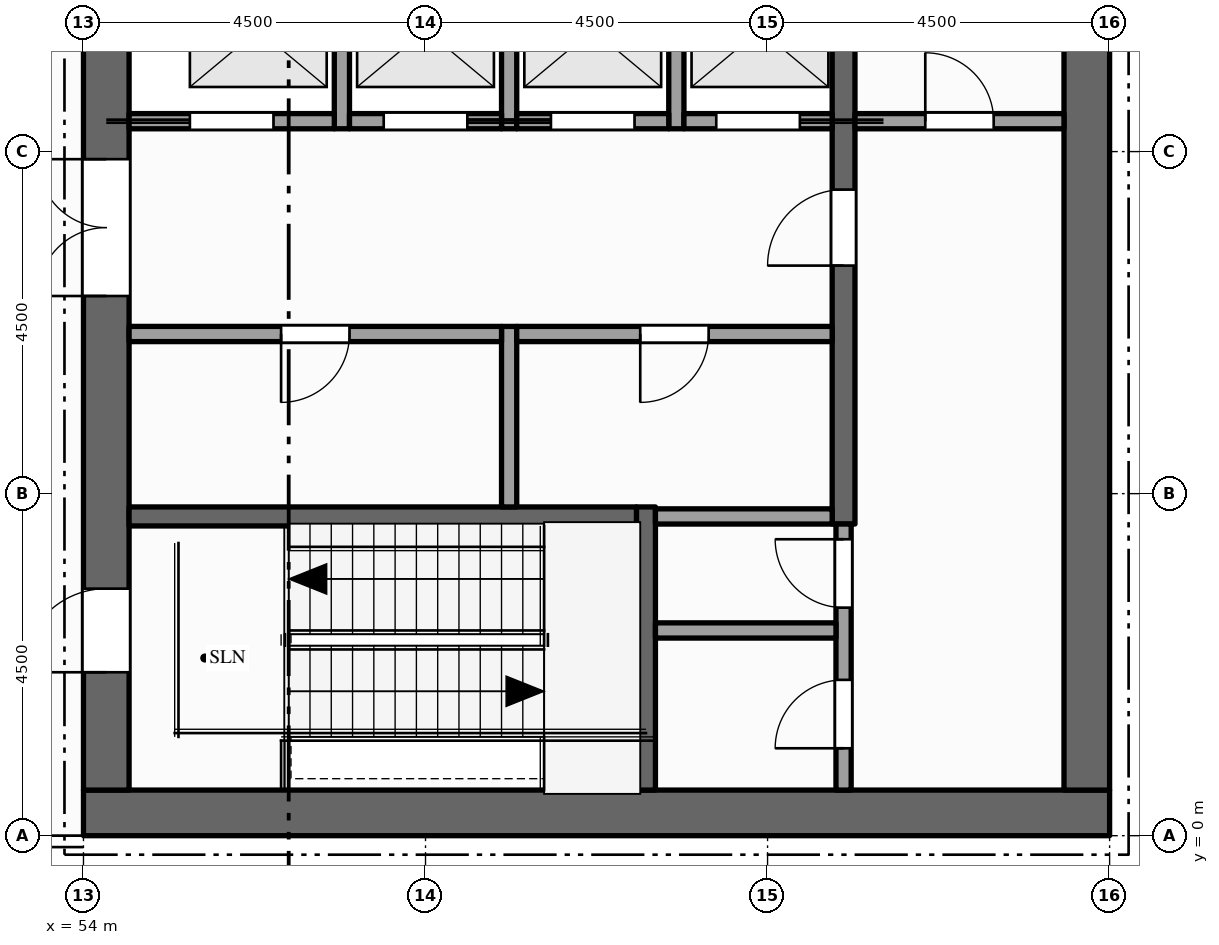
"""IFC4 building model, lengths in metres.
Left out: names, types, materials, properties, quantities, classifications, styles, units other than length and angle.
Written with IfcOpenShell. Run it as: python <this file> out.ifc"""

import sys

from ifc_helpers import new_model, si_unit, direction, frame, frame_2d, origin, place, context, subcontext, project, spatial, rectangle, extrude, element, fill, save


model = new_model("IFC4")
c1 = context("Model", 3, precision=1e-05, world=origin(), true_north=direction((0.0, 1.0)))
c2 = subcontext(c1, "Body", "Model", "MODEL_VIEW")
j1 = project(units=[si_unit("LENGTHUNIT", "METRE"), si_unit("PLANEANGLEUNIT", "RADIAN")], contexts=[c1])
p1 = place(None, origin())
s1 = spatial("IfcSite", under=j1, at=p1, CompositionType="ELEMENT")
p2 = place(p1, origin())
s2 = spatial("IfcBuilding", under=s1, at=p2, CompositionType="ELEMENT")
p3 = place(p2, frame((0.0, 0.0, 305.0)))
s3 = spatial("IfcBuildingStorey", under=s2, at=p3, CompositionType="ELEMENT", Elevation=305.0)
p4 = place(p3, frame((67.5, 0.3, -0.15), z_axis=(0.0, 0.0, 1.0), x_axis=(-1.0, 0.0, 0.0)))
e1 = element("IfcWall", 1, at=p4, inside=s3, PredefinedType="SHEAR", context=c2, shape_type="SweptSolid", body=[
    extrude(rectangle(XDim=13.5, YDim=0.6, at=frame_2d((6.75, 0.0))), origin(), (0.0, 0.0, 1.0), 4.5),
])
p5 = place(p3, frame((54.3, 0.6, -0.15), z_axis=(0.0, 0.0, 1.0), x_axis=(0.0, 1.0, 0.0)))
e2 = element("IfcWall", 2, at=p5, inside=s3, PredefinedType="SHEAR", context=c2, shape_type="SweptSolid", body=[
    extrude(rectangle(XDim=21.3, YDim=0.6, at=frame_2d((10.65, 0.0))), origin(), (0.0, 0.0, 1.0), 4.5),
])
p6 = place(p5, frame((6.5, 0.0, 0.15)))
e3 = element("IfcOpeningElement", 3, at=p6, cuts=e2, PredefinedType="OPENING", context=c2, shape_type="SweptSolid", body=[
    extrude(rectangle(XDim=1.8, YDim=2.1, at=frame_2d((0.9, 1.05))), frame((0.0, 0.31, 0.0), z_axis=(0.0, -1.0, 0.0), x_axis=(1.0, 0.0, 0.0)), (0.0, 0.0, 1.0), 0.62),
])
p7 = place(p5, frame((12.55, 0.0, 0.15)))
e4 = element("IfcOpeningElement", 4, at=p7, cuts=e2, PredefinedType="OPENING", context=c2, shape_type="SweptSolid", body=[
    extrude(rectangle(XDim=1.1, YDim=2.1, at=frame_2d((0.55, 1.05))), frame((0.0, 0.31, 0.0), z_axis=(0.0, -1.0, 0.0), x_axis=(1.0, 0.0, 0.0)), (0.0, 0.0, 1.0), 0.62),
])
p8 = place(p5, frame((1.55, 0.0, 0.15)))
e5 = element("IfcOpeningElement", 5, at=p8, cuts=e2, PredefinedType="OPENING", context=c2, shape_type="SweptSolid", body=[
    extrude(rectangle(XDim=1.1, YDim=2.1, at=frame_2d((0.55, 1.05))), frame((0.0, 0.31, 0.0), z_axis=(0.0, -1.0, 0.0), x_axis=(1.0, 0.0, 0.0)), (0.0, 0.0, 1.0), 0.62),
])
p9 = place(p5, frame((18.75, 0.0, 0.15)))
e6 = element("IfcOpeningElement", 6, at=p9, cuts=e2, PredefinedType="OPENING", context=c2, shape_type="SweptSolid", body=[
    extrude(rectangle(XDim=1.1, YDim=2.1, at=frame_2d((0.55, 1.05))), frame((0.0, 0.31, 0.0), z_axis=(0.0, -1.0, 0.0), x_axis=(1.0, 0.0, 0.0)), (0.0, 0.0, 1.0), 0.62),
])
p10 = place(p3, frame((67.2, 0.6, -0.15), z_axis=(0.0, 0.0, 1.0), x_axis=(0.0, 1.0, 0.0)))
e7 = element("IfcWall", 7, at=p10, inside=s3, PredefinedType="SHEAR", context=c2, shape_type="SweptSolid", body=[
    extrude(rectangle(XDim=21.3, YDim=0.6, at=frame_2d((10.65, 0.0))), origin(), (0.0, 0.0, 1.0), 4.5),
])
p11 = place(p3, frame((57.4, 9.3, 0.0), z_axis=(0.0, 0.0, 1.0), x_axis=(0.0, 1.0, 0.0)))
e8 = element("IfcWall", 8, at=p11, inside=s3, PredefinedType="SOLIDWALL", context=c2, shape_type="SweptSolid", body=[
    extrude(rectangle(XDim=2.6, YDim=0.2, at=frame_2d((1.3, 0.0))), origin(), (0.0, 0.0, 1.0), 4.35),
])
p12 = place(p3, frame((59.6, 4.325, 0.0), z_axis=(0.0, 0.0, 1.0), x_axis=(0.0, 1.0, 0.0)))
e9 = element("IfcWall", 9, at=p12, inside=s3, PredefinedType="PARTITIONING", context=c2, shape_type="SweptSolid", body=[
    extrude(rectangle(XDim=2.375, YDim=0.2, at=frame_2d((1.188, 0.0))), origin(), (0.0, 0.0, 1.0), 4.35),
])
p13 = place(p3, frame((59.6, 9.3, 0.0), z_axis=(0.0, 0.0, 1.0), x_axis=(0.0, 1.0, 0.0)))
e10 = element("IfcWall", 10, at=p13, inside=s3, PredefinedType="SOLIDWALL", context=c2, shape_type="SweptSolid", body=[
    extrude(rectangle(XDim=2.6, YDim=0.2, at=frame_2d((1.3, 0.0))), origin(), (0.0, 0.0, 1.0), 4.35),
])
p14 = place(p3, frame((61.4, 0.6, 0.0), z_axis=(0.0, 0.0, 1.0), x_axis=(0.0, 1.0, 0.0)))
e11 = element("IfcWall", 11, at=p14, inside=s3, PredefinedType="SHEAR", context=c2, shape_type="SweptSolid", body=[
    extrude(rectangle(XDim=3.725, YDim=0.25, at=frame_2d((1.862, 0.0))), origin(), (0.0, 0.0, 1.0), 4.35),
])
p15 = place(p3, frame((61.8, 9.3, 0.0), z_axis=(0.0, 0.0, 1.0), x_axis=(0.0, 1.0, 0.0)))
e12 = element("IfcWall", 12, at=p15, inside=s3, PredefinedType="SOLIDWALL", context=c2, shape_type="SweptSolid", body=[
    extrude(rectangle(XDim=2.6, YDim=0.2, at=frame_2d((1.3, 0.0))), origin(), (0.0, 0.0, 1.0), 4.35),
])
p16 = place(p3, frame((64.0, 0.6, 0.0), z_axis=(0.0, 0.0, 1.0), x_axis=(0.0, 1.0, 0.0)))
e13 = element("IfcWall", 13, at=p16, inside=s3, PredefinedType="PARTITIONING", context=c2, shape_type="SweptSolid", body=[
    extrude(rectangle(XDim=3.5, YDim=0.2, at=frame_2d((1.75, 0.0))), origin(), (0.0, 0.0, 1.0), 4.35),
])
p17 = place(p16, frame((0.55, 0.0, 0.0)))
e14 = element("IfcOpeningElement", 14, at=p17, cuts=e13, PredefinedType="OPENING", context=c2, shape_type="SweptSolid", body=[
    extrude(rectangle(XDim=0.9, YDim=2.1, at=frame_2d((0.45, 1.05))), frame((0.0, 0.11, 0.0), z_axis=(0.0, -1.0, 0.0), x_axis=(1.0, 0.0, 0.0)), (0.0, 0.0, 1.0), 0.22),
])
p18 = place(p16, frame((2.4, 0.0, 0.0)))
e15 = element("IfcOpeningElement", 15, at=p18, cuts=e13, PredefinedType="OPENING", context=c2, shape_type="SweptSolid", body=[
    extrude(rectangle(XDim=0.9, YDim=2.1, at=frame_2d((0.45, 1.05))), frame((0.0, 0.11, 0.0), z_axis=(0.0, -1.0, 0.0), x_axis=(1.0, 0.0, 0.0)), (0.0, 0.0, 1.0), 0.22),
])
p19 = place(p3, frame((64.0, 4.1, 0.0), z_axis=(0.0, 0.0, 1.0), x_axis=(0.0, 1.0, 0.0)))
e16 = element("IfcWall", 16, at=p19, inside=s3, PredefinedType="SHEAR", context=c2, shape_type="SweptSolid", body=[
    extrude(rectangle(XDim=14.5, YDim=0.3, at=frame_2d((7.25, 0.0))), origin(), (0.0, 0.0, 1.0), 4.35),
])
p20 = place(p19, frame((3.4, 0.0, 0.0)))
e17 = element("IfcOpeningElement", 17, at=p20, cuts=e16, PredefinedType="OPENING", context=c2, shape_type="SweptSolid", body=[
    extrude(rectangle(XDim=1.0, YDim=2.1, at=frame_2d((0.5, 1.05))), frame((0.0, 0.16, 0.0), z_axis=(0.0, -1.0, 0.0), x_axis=(1.0, 0.0, 0.0)), (0.0, 0.0, 1.0), 0.32),
])
p21 = place(p19, frame((9.1, 0.0, 0.0)))
e18 = element("IfcOpeningElement", 18, at=p21, cuts=e16, PredefinedType="OPENING", context=c2, shape_type="SweptSolid", body=[
    extrude(rectangle(XDim=1.0, YDim=2.1, at=frame_2d((0.5, 1.05))), frame((0.0, 0.16, 0.0), z_axis=(0.0, -1.0, 0.0), x_axis=(1.0, 0.0, 0.0)), (0.0, 0.0, 1.0), 0.32),
])
p22 = place(p3, frame((61.525, 2.7, 0.0), z_axis=(0.0, 0.0, 1.0), x_axis=(1.0, 0.0, 0.0)))
e19 = element("IfcWall", 19, at=p22, inside=s3, PredefinedType="PARTITIONING", context=c2, shape_type="SweptSolid", body=[
    extrude(rectangle(XDim=2.375, YDim=0.2, at=frame_2d((1.188, 0.0))), origin(), (0.0, 0.0, 1.0), 4.35),
])
p23 = place(p3, frame((54.6, 4.2, 0.0), z_axis=(0.0, 0.0, 1.0), x_axis=(1.0, 0.0, 0.0)))
e20 = element("IfcWall", 20, at=p23, inside=s3, PredefinedType="SHEAR", context=c2, shape_type="SweptSolid", body=[
    extrude(rectangle(XDim=6.675, YDim=0.25, at=frame_2d((3.337, 0.0))), origin(), (0.0, 0.0, 1.0), 4.35),
])
p24 = place(p3, frame((61.525, 4.2, 0.0), z_axis=(0.0, 0.0, 1.0), x_axis=(1.0, 0.0, 0.0)))
e21 = element("IfcWall", 21, at=p24, inside=s3, PredefinedType="PARTITIONING", context=c2, shape_type="SweptSolid", body=[
    extrude(rectangle(XDim=2.325, YDim=0.2, at=frame_2d((1.163, 0.0))), origin(), (0.0, 0.0, 1.0), 4.35),
])
p25 = place(p3, frame((54.6, 6.6, 0.0), z_axis=(0.0, 0.0, 1.0), x_axis=(1.0, 0.0, 0.0)))
e22 = element("IfcWall", 22, at=p25, inside=s3, PredefinedType="PARTITIONING", context=c2, shape_type="SweptSolid", body=[
    extrude(rectangle(XDim=4.9, YDim=0.2, at=frame_2d((2.45, 0.0))), origin(), (0.0, 0.0, 1.0), 4.35),
])
p26 = place(p25, frame((2.0, 0.0, 0.0)))
e23 = element("IfcOpeningElement", 23, at=p26, cuts=e22, PredefinedType="OPENING", context=c2, shape_type="SweptSolid", body=[
    extrude(rectangle(XDim=0.9, YDim=2.1, at=frame_2d((0.45, 1.05))), frame((0.0, 0.11, 0.0), z_axis=(0.0, -1.0, 0.0), x_axis=(1.0, 0.0, 0.0)), (0.0, 0.0, 1.0), 0.22),
])
p27 = place(p3, frame((59.7, 6.6, 0.0), z_axis=(0.0, 0.0, 1.0), x_axis=(1.0, 0.0, 0.0)))
e24 = element("IfcWall", 24, at=p27, inside=s3, PredefinedType="PARTITIONING", context=c2, shape_type="SweptSolid", body=[
    extrude(rectangle(XDim=4.15, YDim=0.2, at=frame_2d((2.075, 0.0))), origin(), (0.0, 0.0, 1.0), 4.35),
])
p28 = place(p27, frame((1.625, 0.0, 0.0)))
e25 = element("IfcOpeningElement", 25, at=p28, cuts=e24, PredefinedType="OPENING", context=c2, shape_type="SweptSolid", body=[
    extrude(rectangle(XDim=0.9, YDim=2.1, at=frame_2d((0.45, 1.05))), frame((0.0, 0.11, 0.0), z_axis=(0.0, -1.0, 0.0), x_axis=(1.0, 0.0, 0.0)), (0.0, 0.0, 1.0), 0.22),
])
p29 = place(p3, frame((54.6, 9.4, 0.0), z_axis=(0.0, 0.0, 1.0), x_axis=(1.0, 0.0, 0.0)))
e26 = element("IfcWall", 26, at=p29, inside=s3, PredefinedType="SOLIDWALL", context=c2, shape_type="SweptSolid", body=[
    extrude(rectangle(XDim=2.7, YDim=0.2, at=frame_2d((1.35, 0.0))), origin(), (0.0, 0.0, 1.0), 4.35),
])
p30 = place(p29, frame((0.8, 0.0, 0.012)))
e27 = element("IfcOpeningElement", 27, at=p30, cuts=e26, PredefinedType="OPENING", context=c2, shape_type="SweptSolid", body=[
    extrude(rectangle(XDim=1.1, YDim=2.1, at=frame_2d((0.55, 1.05))), frame((0.0, 0.11, 0.0), z_axis=(0.0, -1.0, 0.0), x_axis=(1.0, 0.0, 0.0)), (0.0, 0.0, 1.0), 0.22),
])
p31 = place(p3, frame((57.5, 9.4, 0.0), z_axis=(0.0, 0.0, 1.0), x_axis=(1.0, 0.0, 0.0)))
e28 = element("IfcWall", 28, at=p31, inside=s3, PredefinedType="SOLIDWALL", context=c2, shape_type="SweptSolid", body=[
    extrude(rectangle(XDim=2.0, YDim=0.2, at=frame_2d((1.0, 0.0))), origin(), (0.0, 0.0, 1.0), 4.35),
])
p32 = place(p31, frame((0.45, 0.0, 0.012)))
e29 = element("IfcOpeningElement", 29, at=p32, cuts=e28, PredefinedType="OPENING", context=c2, shape_type="SweptSolid", body=[
    extrude(rectangle(XDim=1.1, YDim=2.1, at=frame_2d((0.55, 1.05))), frame((0.0, 0.11, 0.0), z_axis=(0.0, -1.0, 0.0), x_axis=(1.0, 0.0, 0.0)), (0.0, 0.0, 1.0), 0.22),
])
p33 = place(p3, frame((59.7, 9.4, 0.0), z_axis=(0.0, 0.0, 1.0), x_axis=(1.0, 0.0, 0.0)))
e30 = element("IfcWall", 30, at=p33, inside=s3, PredefinedType="SOLIDWALL", context=c2, shape_type="SweptSolid", body=[
    extrude(rectangle(XDim=2.0, YDim=0.2, at=frame_2d((1.0, 0.0))), origin(), (0.0, 0.0, 1.0), 4.35),
])
p34 = place(p33, frame((0.45, 0.0, 0.012)))
e31 = element("IfcOpeningElement", 31, at=p34, cuts=e30, PredefinedType="OPENING", context=c2, shape_type="SweptSolid", body=[
    extrude(rectangle(XDim=1.1, YDim=2.1, at=frame_2d((0.55, 1.05))), frame((0.0, 0.11, 0.0), z_axis=(0.0, -1.0, 0.0), x_axis=(1.0, 0.0, 0.0)), (0.0, 0.0, 1.0), 0.22),
])
p35 = place(p3, frame((61.9, 9.4, 0.0), z_axis=(0.0, 0.0, 1.0), x_axis=(1.0, 0.0, 0.0)))
e32 = element("IfcWall", 32, at=p35, inside=s3, PredefinedType="SOLIDWALL", context=c2, shape_type="SweptSolid", body=[
    extrude(rectangle(XDim=1.95, YDim=0.2, at=frame_2d((0.975, 0.0))), origin(), (0.0, 0.0, 1.0), 4.35),
])
p36 = place(p35, frame((0.425, 0.0, 0.012)))
e33 = element("IfcOpeningElement", 33, at=p36, cuts=e32, PredefinedType="OPENING", context=c2, shape_type="SweptSolid", body=[
    extrude(rectangle(XDim=1.1, YDim=2.1, at=frame_2d((0.55, 1.05))), frame((0.0, 0.11, 0.0), z_axis=(0.0, -1.0, 0.0), x_axis=(1.0, 0.0, 0.0)), (0.0, 0.0, 1.0), 0.22),
])
p37 = place(p3, frame((64.15, 9.4, 0.0), z_axis=(0.0, 0.0, 1.0), x_axis=(1.0, 0.0, 0.0)))
e34 = element("IfcWall", 34, at=p37, inside=s3, PredefinedType="PARTITIONING", context=c2, shape_type="SweptSolid", body=[
    extrude(rectangle(XDim=2.75, YDim=0.2, at=frame_2d((1.375, 0.0))), origin(), (0.0, 0.0, 1.0), 4.35),
])
p38 = place(p37, frame((0.925, 0.0, 0.0)))
e35 = element("IfcOpeningElement", 35, at=p38, cuts=e34, PredefinedType="OPENING", context=c2, shape_type="SweptSolid", body=[
    extrude(rectangle(XDim=0.9, YDim=2.1, at=frame_2d((0.45, 1.05))), frame((0.0, 0.11, 0.0), z_axis=(0.0, -1.0, 0.0), x_axis=(1.0, 0.0, 0.0)), (0.0, 0.0, 1.0), 0.22),
])
p39 = place(p30, origin())
e36 = element("IfcDoor", 36, at=p39, inside=s3, OperationType="SLIDING_TO_LEFT", PredefinedType="DOOR", context=c2, shape_type="SweptSolid", body=[
    extrude(rectangle(XDim=1.1, YDim=2.1, at=frame_2d((0.55, 1.05))), frame((0.0, 0.025, 0.0), z_axis=(0.0, -1.0, 0.0), x_axis=(1.0, 0.0, 0.0)), (0.0, 0.0, 1.0), 0.05),
])
fill(e27, e36)
p40 = place(p32, origin())
e37 = element("IfcDoor", 37, at=p40, inside=s3, OperationType="SLIDING_TO_RIGHT", PredefinedType="DOOR", context=c2, shape_type="SweptSolid", body=[
    extrude(rectangle(XDim=1.1, YDim=2.1, at=frame_2d((0.55, 1.05))), frame((0.0, 0.025, 0.0), z_axis=(0.0, -1.0, 0.0), x_axis=(1.0, 0.0, 0.0)), (0.0, 0.0, 1.0), 0.05),
])
fill(e29, e37)
p41 = place(p34, origin())
e38 = element("IfcDoor", 38, at=p41, inside=s3, OperationType="SLIDING_TO_LEFT", PredefinedType="DOOR", context=c2, shape_type="SweptSolid", body=[
    extrude(rectangle(XDim=1.1, YDim=2.1, at=frame_2d((0.55, 1.05))), frame((0.0, 0.025, 0.0), z_axis=(0.0, -1.0, 0.0), x_axis=(1.0, 0.0, 0.0)), (0.0, 0.0, 1.0), 0.05),
])
fill(e31, e38)
p42 = place(p36, origin())
e39 = element("IfcDoor", 39, at=p42, inside=s3, OperationType="SLIDING_TO_RIGHT", PredefinedType="DOOR", context=c2, shape_type="SweptSolid", body=[
    extrude(rectangle(XDim=1.1, YDim=2.1, at=frame_2d((0.55, 1.05))), frame((0.0, 0.025, 0.0), z_axis=(0.0, -1.0, 0.0), x_axis=(1.0, 0.0, 0.0)), (0.0, 0.0, 1.0), 0.05),
])
fill(e33, e39)
p43 = place(p6, origin())
e40 = element("IfcDoor", 40, at=p43, inside=s3, OperationType="DOUBLE_DOOR_SINGLE_SWING", PredefinedType="DOOR", context=c2, shape_type="SweptSolid", body=[
    extrude(rectangle(XDim=1.8, YDim=2.1, at=frame_2d((0.9, 1.05))), frame((0.0, 0.025, 0.0), z_axis=(0.0, -1.0, 0.0), x_axis=(1.0, 0.0, 0.0)), (0.0, 0.0, 1.0), 0.05),
])
fill(e3, e40)
p44 = place(p20, origin())
e41 = element("IfcDoor", 41, at=p44, inside=s3, OperationType="SINGLE_SWING_LEFT", PredefinedType="DOOR", context=c2, shape_type="SweptSolid", body=[
    extrude(rectangle(XDim=1.0, YDim=2.1, at=frame_2d((0.5, 1.05))), frame((0.0, 0.025, 0.0), z_axis=(0.0, -1.0, 0.0), x_axis=(1.0, 0.0, 0.0)), (0.0, 0.0, 1.0), 0.05),
])
fill(e17, e41)
p45 = place(p38, origin())
e42 = element("IfcDoor", 42, at=p45, inside=s3, OperationType="SINGLE_SWING_LEFT", PredefinedType="DOOR", context=c2, shape_type="SweptSolid", body=[
    extrude(rectangle(XDim=0.9, YDim=2.1, at=frame_2d((0.45, 1.05))), frame((0.0, 0.025, 0.0), z_axis=(0.0, -1.0, 0.0), x_axis=(1.0, 0.0, 0.0)), (0.0, 0.0, 1.0), 0.05),
])
fill(e35, e42)
p46 = place(p8, origin())
e43 = element("IfcDoor", 43, at=p46, inside=s3, OperationType="SINGLE_SWING_LEFT", PredefinedType="DOOR", context=c2, shape_type="SweptSolid", body=[
    extrude(rectangle(XDim=1.1, YDim=2.1, at=frame_2d((0.55, 1.05))), frame((0.0, 0.025, 0.0), z_axis=(0.0, -1.0, 0.0), x_axis=(1.0, 0.0, 0.0)), (0.0, 0.0, 1.0), 0.05),
])
fill(e5, e43)
p47 = place(p17, origin())
e44 = element("IfcDoor", 44, at=p47, inside=s3, OperationType="SINGLE_SWING_LEFT", PredefinedType="DOOR", context=c2, shape_type="SweptSolid", body=[
    extrude(rectangle(XDim=0.9, YDim=2.1, at=frame_2d((0.45, 1.05))), frame((0.0, 0.025, 0.0), z_axis=(0.0, -1.0, 0.0), x_axis=(1.0, 0.0, 0.0)), (0.0, 0.0, 1.0), 0.05),
])
fill(e14, e44)
p48 = place(p18, origin())
e45 = element("IfcDoor", 45, at=p48, inside=s3, OperationType="SINGLE_SWING_RIGHT", PredefinedType="DOOR", context=c2, shape_type="SweptSolid", body=[
    extrude(rectangle(XDim=0.9, YDim=2.1, at=frame_2d((0.45, 1.05))), frame((0.0, 0.025, 0.0), z_axis=(0.0, -1.0, 0.0), x_axis=(1.0, 0.0, 0.0)), (0.0, 0.0, 1.0), 0.05),
])
fill(e15, e45)
p49 = place(p26, origin())
e46 = element("IfcDoor", 46, at=p49, inside=s3, OperationType="SINGLE_SWING_LEFT", PredefinedType="DOOR", context=c2, shape_type="SweptSolid", body=[
    extrude(rectangle(XDim=0.9, YDim=2.1, at=frame_2d((0.45, 1.05))), frame((0.0, 0.025, 0.0), z_axis=(0.0, -1.0, 0.0), x_axis=(1.0, 0.0, 0.0)), (0.0, 0.0, 1.0), 0.05),
])
fill(e23, e46)
p50 = place(p28, origin())
e47 = element("IfcDoor", 47, at=p50, inside=s3, OperationType="SINGLE_SWING_LEFT", PredefinedType="DOOR", context=c2, shape_type="SweptSolid", body=[
    extrude(rectangle(XDim=0.9, YDim=2.1, at=frame_2d((0.45, 1.05))), frame((0.0, 0.025, 0.0), z_axis=(0.0, -1.0, 0.0), x_axis=(1.0, 0.0, 0.0)), (0.0, 0.0, 1.0), 0.05),
])
fill(e25, e47)
save(model, sys.argv[1])
